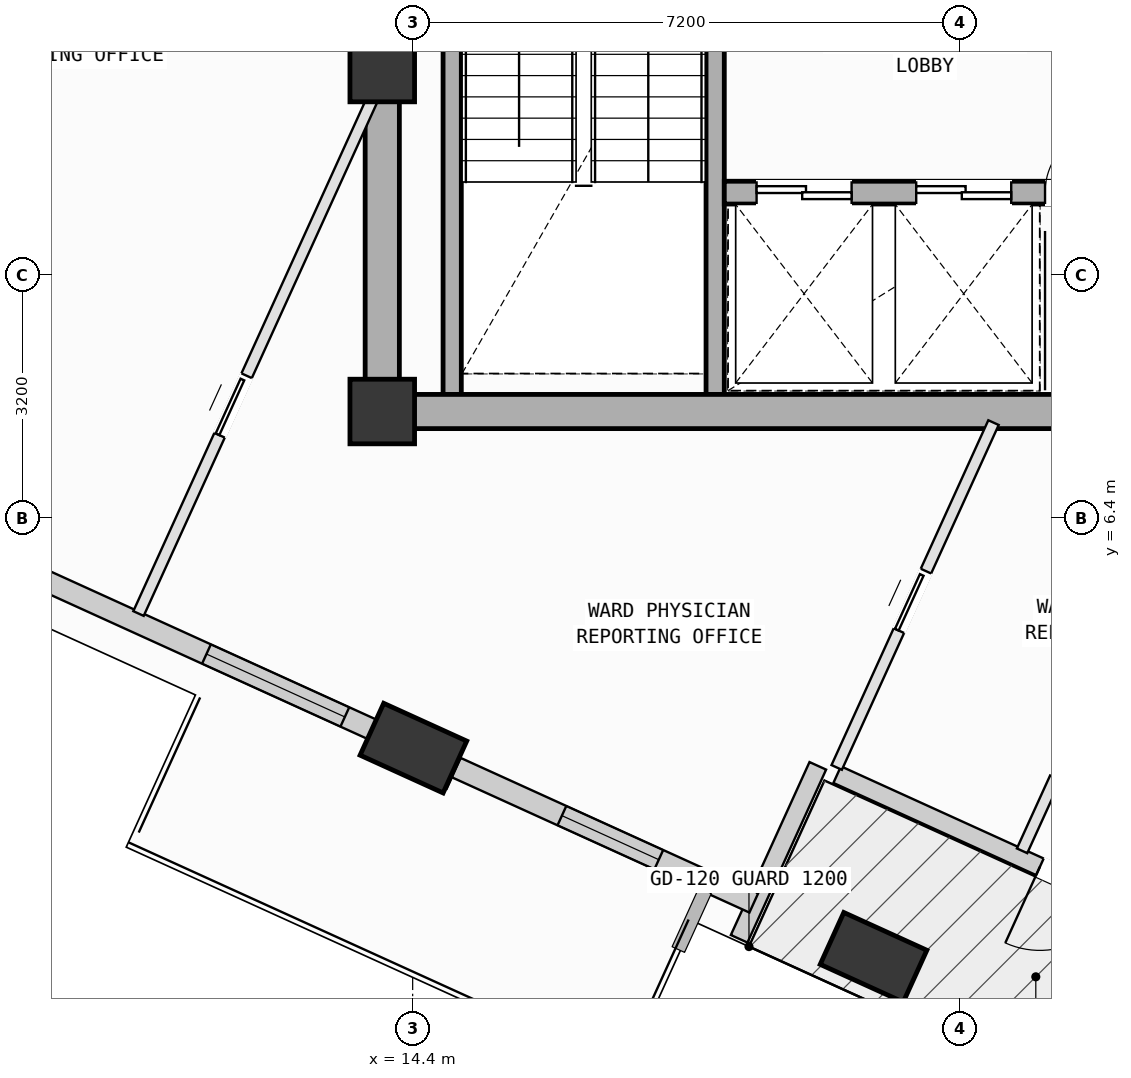
"""IFC4 building model, lengths in metres.
Left out: names, types, materials, properties, quantities, classifications, styles, units other than length and angle.
Written with IfcOpenShell. Run it as: python <this file> out.ifc"""

import sys

from ifc_helpers import new_model, si_unit, direction, frame, frame_2d, origin, origin_2d, place, context, subcontext, project, spatial, rectangle, extrude, element, fill, save


model = new_model("IFC4")
c1 = context("Model", 3, precision=1e-05, world=origin(), true_north=direction((0.0, 1.0)))
c2 = subcontext(c1, "Body", "Model", "MODEL_VIEW")
j1 = project(units=[si_unit("LENGTHUNIT", "METRE"), si_unit("PLANEANGLEUNIT", "RADIAN")], contexts=[c1])
p1 = place(None, origin())
s1 = spatial("IfcSite", under=j1, at=p1, CompositionType="ELEMENT")
p2 = place(p1, origin())
s2 = spatial("IfcBuilding", under=s1, at=p2, CompositionType="ELEMENT")
p3 = place(p2, frame((0.0, 0.0, 304.6)))
s3 = spatial("IfcBuildingStorey", under=s2, at=p3, CompositionType="ELEMENT", Elevation=304.6)
for number, where, z_axis, x_axis in (
    (1, (14.0, 7.8, 0.0), (0.0, 0.0, 1.0), (1.0, 0.0, 0.0)),
    (2, (14.0, 12.3, 0.0), (0.0, 0.0, 1.0), (1.0, 0.0, 0.0)),
):
    element("IfcColumn", number, at=place(p3, frame(where, z_axis=z_axis, x_axis=x_axis)), inside=s3, PredefinedType="COLUMN", context=c2, shape_type="SweptSolid", body=[
        extrude(rectangle(XDim=0.85, YDim=0.85, at=origin_2d()), origin(), (0.0, 0.0, 1.0), 4.0),
    ])
p4 = place(p3, frame((14.41, 3.371, 0.002), z_axis=(0.088860188702, -0.078300708321, 0.992961663882), x_axis=(-0.910187911133, -0.411284505845, 0.049020625044)))
e3 = element("IfcColumn", 3, at=p4, inside=s3, PredefinedType="COLUMN", context=c2, shape_type="SweptSolid", body=[
    extrude(rectangle(XDim=1.2, YDim=0.75, at=origin_2d()), origin(), (0.0, 0.0, 1.0), 3.954),
])
p5 = place(p3, frame((20.464, 0.619, 0.002), z_axis=(0.100016423417, -0.053280353956, 0.993558211143), x_axis=(-0.790946445889, -0.61008500416, 0.046904236858)))
e4 = element("IfcColumn", 4, at=p5, inside=s3, PredefinedType="COLUMN", context=c2, shape_type="SweptSolid", body=[
    extrude(rectangle(XDim=1.2, YDim=0.75, at=origin_2d()), origin(), (0.0, 0.0, 1.0), 3.954),
])
p6 = place(p3, frame((26.321, 0.141, 0.0), z_axis=(0.0, 0.0, 1.0), x_axis=(-0.910318420634, 0.413908653032, 0.0)))
e5 = element("IfcWall", 5, at=p6, inside=s3, PredefinedType="SOLIDWALL", context=c2, shape_type="SweptSolid", body=[
    extrude(rectangle(XDim=6.96, YDim=0.24, at=frame_2d((3.48, 0.0))), origin(), (0.0, 0.0, 1.0), 3.265),
])
p7 = place(p6, frame((2.93, 0.0, 0.0)))
e6 = element("IfcOpeningElement", 6, at=p7, cuts=e5, PredefinedType="OPENING", context=c2, shape_type="SweptSolid", body=[
    extrude(rectangle(XDim=1.1, YDim=2.15, at=frame_2d((0.55, 1.075))), frame((0.0, 0.13, 0.0), z_axis=(0.0, -1.0, 0.0), x_axis=(1.0, 0.0, 0.0)), (0.0, 0.0, 1.0), 0.26),
])
p8 = place(p3, frame((19.73, 3.138, 0.0), z_axis=(0.0, 0.0, 1.0), x_axis=(-0.413942727545, -0.910302926675, 0.0)))
e7 = element("IfcWall", 7, at=p8, inside=s3, PredefinedType="SOLIDWALL", context=c2, shape_type="SweptSolid", body=[
    extrude(rectangle(XDim=2.5, YDim=0.24, at=frame_2d((1.25, 0.0))), origin(), (0.0, 0.0, 1.0), 3.265),
])
p9 = place(p3, frame((14.261, 3.439, 0.0), z_axis=(0.0, 0.0, 1.0), x_axis=(-0.910309106428, 0.413929137359, 0.0)))
e8 = element("IfcWall", 8, at=p9, inside=s3, PredefinedType="SOLIDWALL", context=c2, shape_type="SweptSolid", body=[
    extrude(rectangle(XDim=5.83, YDim=0.28, at=frame_2d((2.915, 0.0))), origin(), (0.0, 0.0, 1.0), 3.265),
])
p10 = place(p9, frame((0.827, 0.0, 0.75)))
e9 = element("IfcOpeningElement", 9, at=p10, cuts=e8, PredefinedType="OPENING", context=c2, shape_type="SweptSolid", body=[
    extrude(rectangle(XDim=2.0, YDim=1.95, at=frame_2d((1.0, 0.975))), frame((0.0, 0.15, 0.0), z_axis=(0.0, -1.0, 0.0), x_axis=(1.0, 0.0, 0.0)), (0.0, 0.0, 1.0), 0.3),
])
p11 = place(p3, frame((18.888, 1.335, 0.0), z_axis=(0.0, 0.0, 1.0), x_axis=(-0.910315921542, 0.413914149296, 0.0)))
e10 = element("IfcWall", 10, at=p11, inside=s3, PredefinedType="SOLIDWALL", context=c2, shape_type="SweptSolid", body=[
    extrude(rectangle(XDim=4.301, YDim=0.28, at=frame_2d((2.15, 0.0))), origin(), (0.0, 0.0, 1.0), 3.245),
])
p12 = place(p11, frame((1.374, 0.0, 0.75)))
e11 = element("IfcOpeningElement", 11, at=p12, cuts=e10, PredefinedType="OPENING", context=c2, shape_type="SweptSolid", body=[
    extrude(rectangle(XDim=1.4, YDim=1.85, at=frame_2d((0.7, 0.925))), frame((0.0, 0.15, 0.0), z_axis=(0.0, -1.0, 0.0), x_axis=(1.0, 0.0, 0.0)), (0.0, 0.0, 1.0), 0.3),
])
for number, where, z_axis, x_axis in (
    (12, (18.38, 15.12, 0.0), (0.0, 0.0, 1.0), (0.0, -1.0, 0.0)),
    (13, (14.92, 8.025, 0.0), (0.0, 0.0, 1.0), (0.0, 1.0, 0.0)),
):
    element("IfcWall", number, at=place(p3, frame(where, z_axis=z_axis, x_axis=x_axis)), inside=s3, PredefinedType="SOLIDWALL", context=c2, shape_type="SweptSolid", body=[
        extrude(rectangle(XDim=7.095, YDim=0.24, at=frame_2d((3.548, 0.0))), origin(), (0.0, 0.0, 1.0), 3.78),
    ])
p13 = place(p3, frame((14.0, 7.8, 0.0), z_axis=(0.0, 0.0, 1.0), x_axis=(1.0, 0.0, 0.0)))
e14 = element("IfcWall", 14, at=p13, inside=s3, PredefinedType="SHEAR", context=c2, shape_type="SweptSolid", body=[
    extrude(rectangle(XDim=10.8, YDim=0.45, at=frame_2d((5.4, 0.0))), origin(), (0.0, 0.0, 1.0), 3.78),
])
p14 = place(p3, frame((14.0, 16.8, 0.0), z_axis=(0.0, 0.0, 1.0), x_axis=(0.0, -1.0, 0.0)))
e15 = element("IfcWall", 15, at=p14, inside=s3, PredefinedType="SHEAR", context=c2, shape_type="SweptSolid", body=[
    extrude(rectangle(XDim=9.0, YDim=0.45, at=frame_2d((4.5, 0.0))), origin(), (0.0, 0.0, 1.0), 3.78),
])
p15 = place(p3, frame((18.5, 10.68, 0.0), z_axis=(0.0, 0.0, 1.0), x_axis=(1.0, 0.0, 0.0)))
e16 = element("IfcWall", 16, at=p15, inside=s3, PredefinedType="SOLIDWALL", context=c2, shape_type="SweptSolid", body=[
    extrude(rectangle(XDim=5.3, YDim=0.3, at=frame_2d((2.65, 0.0))), origin(), (0.0, 0.0, 1.0), 3.78),
])
p16 = place(p15, frame((4.22, 0.0, 0.0)))
e17 = element("IfcOpeningElement", 17, at=p16, cuts=e16, PredefinedType="OPENING", context=c2, shape_type="SweptSolid", body=[
    extrude(rectangle(XDim=0.86, YDim=2.06, at=frame_2d((0.43, 1.03))), frame((0.0, 0.16, 0.0), z_axis=(0.0, -1.0, 0.0), x_axis=(1.0, 0.0, 0.0)), (0.0, 0.0, 1.0), 0.32),
])
p17 = place(p15, frame((0.425, 0.0, 0.0)))
e18 = element("IfcOpeningElement", 18, at=p17, cuts=e16, PredefinedType="OPENING", context=c2, shape_type="SweptSolid", body=[
    extrude(rectangle(XDim=1.25, YDim=2.18, at=frame_2d((0.625, 1.09))), frame((0.0, 0.16, 0.0), z_axis=(0.0, -1.0, 0.0), x_axis=(1.0, 0.0, 0.0)), (0.0, 0.0, 1.0), 0.32),
])
p18 = place(p15, frame((2.525, 0.0, 0.0)))
e19 = element("IfcOpeningElement", 19, at=p18, cuts=e16, PredefinedType="OPENING", context=c2, shape_type="SweptSolid", body=[
    extrude(rectangle(XDim=1.25, YDim=2.18, at=frame_2d((0.625, 1.09))), frame((0.0, 0.16, 0.0), z_axis=(0.0, -1.0, 0.0), x_axis=(1.0, 0.0, 0.0)), (0.0, 0.0, 1.0), 0.32),
])
p19 = place(p3, frame((22.855, 2.98, 0.0), z_axis=(0.0, 0.0, 1.0), x_axis=(-0.414326054961, -0.910128518496, 0.0)))
e20 = element("IfcWall", 20, at=p19, inside=s3, PredefinedType="PARTITIONING", context=c2, shape_type="SweptSolid", body=[
    extrude(rectangle(XDim=1.055, YDim=0.15, at=frame_2d((0.527, 0.0))), origin(), (0.0, 0.0, 1.0), 3.78),
])
p20 = place(p3, frame((19.979, 3.117, 0.0), z_axis=(0.0, 0.0, 1.0), x_axis=(0.413913658196, 0.910316144841, 0.0)))
e21 = element("IfcWall", 21, at=p20, inside=s3, PredefinedType="PARTITIONING", context=c2, shape_type="SweptSolid", body=[
    extrude(rectangle(XDim=4.984, YDim=0.15, at=frame_2d((2.492, 0.0))), origin(), (0.0, 0.0, 1.0), 3.78),
])
p21 = place(p20, frame((1.977, 0.0, 0.0)))
e22 = element("IfcOpeningElement", 22, at=p21, cuts=e21, PredefinedType="OPENING", context=c2, shape_type="SweptSolid", body=[
    extrude(rectangle(XDim=0.86, YDim=2.06, at=frame_2d((0.43, 1.03))), frame((0.0, 0.085, 0.0), z_axis=(0.0, -1.0, 0.0), x_axis=(1.0, 0.0, 0.0)), (0.0, 0.0, 1.0), 0.17),
])
p22 = place(p3, frame((14.879, 2.905, 0.0), z_axis=(0.0, 0.0, 1.0), x_axis=(-0.910398506959, 0.413732472169, 0.0)))
e23 = element("IfcWall", 23, at=p22, inside=s3, PredefinedType="PARTITIONING", context=c2, shape_type="SweptSolid", body=[
    extrude(rectangle(XDim=0.783, YDim=0.15, at=frame_2d((0.392, 0.0))), origin(), (0.0, 0.0, 1.0), 3.245),
])
p23 = place(p3, frame((10.793, 5.142, 0.0), z_axis=(0.0, 0.0, 1.0), x_axis=(0.413936344261, 0.910305829323, 0.0)))
e24 = element("IfcWall", 24, at=p23, inside=s3, PredefinedType="PARTITIONING", context=c2, shape_type="SweptSolid", body=[
    extrude(rectangle(XDim=7.446, YDim=0.15, at=frame_2d((3.723, 0.0))), origin(), (0.0, 0.0, 1.0), 3.78),
])
p24 = place(p23, frame((2.577, 0.0, 0.0)))
e25 = element("IfcOpeningElement", 25, at=p24, cuts=e24, PredefinedType="OPENING", context=c2, shape_type="SweptSolid", body=[
    extrude(rectangle(XDim=0.86, YDim=2.06, at=frame_2d((0.43, 1.03))), frame((0.0, 0.085, 0.0), z_axis=(0.0, -1.0, 0.0), x_axis=(1.0, 0.0, 0.0)), (0.0, 0.0, 1.0), 0.17),
])
p25 = place(p7, origin())
e26 = element("IfcDoor", 26, at=p25, inside=s3, OperationType="SINGLE_SWING_RIGHT", PredefinedType="DOOR", context=c2, shape_type="SweptSolid", body=[
    extrude(rectangle(XDim=1.1, YDim=2.15, at=frame_2d((0.55, 1.075))), frame((0.0, 0.025, 0.0), z_axis=(0.0, -1.0, 0.0), x_axis=(1.0, 0.0, 0.0)), (0.0, 0.0, 1.0), 0.05),
])
fill(e6, e26)
p26 = place(p10, origin())
e27 = element("IfcWindow", 27, at=p26, inside=s3, PartitioningType="SINGLE_PANEL", PredefinedType="WINDOW", context=c2, shape_type="SweptSolid", body=[
    extrude(rectangle(XDim=2.0, YDim=1.95, at=frame_2d((1.0, 0.975))), frame((0.0, 0.03, 0.0), z_axis=(0.0, -1.0, 0.0), x_axis=(1.0, 0.0, 0.0)), (0.0, 0.0, 1.0), 0.06),
])
fill(e9, e27)
p27 = place(p12, origin())
e28 = element("IfcWindow", 28, at=p27, inside=s3, PartitioningType="SINGLE_PANEL", PredefinedType="WINDOW", context=c2, shape_type="SweptSolid", body=[
    extrude(rectangle(XDim=1.4, YDim=1.85, at=frame_2d((0.7, 0.925))), frame((0.0, 0.03, 0.0), z_axis=(0.0, -1.0, 0.0), x_axis=(1.0, 0.0, 0.0)), (0.0, 0.0, 1.0), 0.06),
])
fill(e11, e28)
p28 = place(p16, origin())
e29 = element("IfcDoor", 29, at=p28, inside=s3, OperationType="SINGLE_SWING_RIGHT", PredefinedType="DOOR", context=c2, shape_type="SweptSolid", body=[
    extrude(rectangle(XDim=0.86, YDim=2.06, at=frame_2d((0.43, 1.03))), frame((0.0, 0.025, 0.0), z_axis=(0.0, -1.0, 0.0), x_axis=(1.0, 0.0, 0.0)), (0.0, 0.0, 1.0), 0.05),
])
fill(e17, e29)
p29 = place(p17, origin())
e30 = element("IfcDoor", 30, at=p29, inside=s3, OperationType="DOUBLE_DOOR_SLIDING", PredefinedType="DOOR", context=c2, shape_type="SweptSolid", body=[
    extrude(rectangle(XDim=1.25, YDim=2.18, at=frame_2d((0.625, 1.09))), frame((0.0, 0.025, 0.0), z_axis=(0.0, -1.0, 0.0), x_axis=(1.0, 0.0, 0.0)), (0.0, 0.0, 1.0), 0.05),
])
fill(e18, e30)
p30 = place(p18, origin())
e31 = element("IfcDoor", 31, at=p30, inside=s3, OperationType="DOUBLE_DOOR_SLIDING", PredefinedType="DOOR", context=c2, shape_type="SweptSolid", body=[
    extrude(rectangle(XDim=1.25, YDim=2.18, at=frame_2d((0.625, 1.09))), frame((0.0, 0.025, 0.0), z_axis=(0.0, -1.0, 0.0), x_axis=(1.0, 0.0, 0.0)), (0.0, 0.0, 1.0), 0.05),
])
fill(e19, e31)
p31 = place(p21, origin())
e32 = element("IfcDoor", 32, at=p31, inside=s3, OperationType="SLIDING_TO_LEFT", PredefinedType="DOOR", context=c2, shape_type="SweptSolid", body=[
    extrude(rectangle(XDim=0.86, YDim=2.06, at=frame_2d((0.43, 1.03))), frame((0.0, 0.025, 0.0), z_axis=(0.0, -1.0, 0.0), x_axis=(1.0, 0.0, 0.0)), (0.0, 0.0, 1.0), 0.05),
])
fill(e22, e32)
p32 = place(p24, origin())
e33 = element("IfcDoor", 33, at=p32, inside=s3, OperationType="SLIDING_TO_LEFT", PredefinedType="DOOR", context=c2, shape_type="SweptSolid", body=[
    extrude(rectangle(XDim=0.86, YDim=2.06, at=frame_2d((0.43, 1.03))), frame((0.0, 0.025, 0.0), z_axis=(0.0, -1.0, 0.0), x_axis=(1.0, 0.0, 0.0)), (0.0, 0.0, 1.0), 0.05),
])
fill(e25, e33)
save(model, sys.argv[1])
